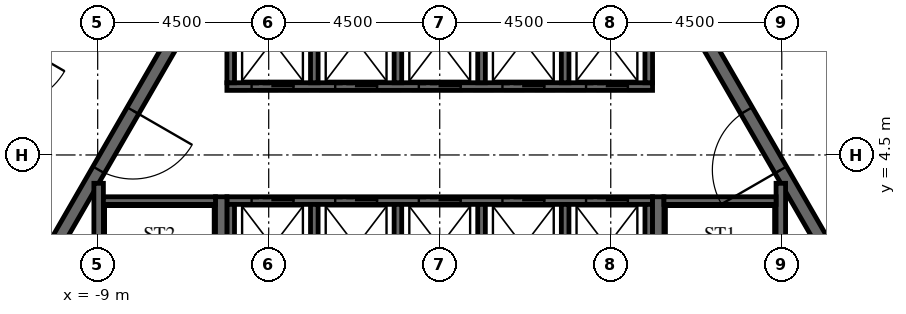
"""IFC4 building model, lengths in metres.
Left out: names, types, materials, properties, quantities, classifications, styles, units other than length and angle.
Written with IfcOpenShell. Run it as: python <this file> out.ifc"""

import sys

from ifc_helpers import new_model, si_unit, direction, frame, frame_2d, origin, place, context, subcontext, project, spatial, polyline, rectangle, outline, extrude, element, fill, save


model = new_model("IFC4")
c1 = context("Model", 3, precision=1e-05, world=origin(), true_north=direction((0.0, 1.0)))
c2 = subcontext(c1, "Body", "Model", "MODEL_VIEW")
j1 = project(units=[si_unit("LENGTHUNIT", "METRE"), si_unit("PLANEANGLEUNIT", "RADIAN")], contexts=[c1])
p1 = place(None, origin())
s1 = spatial("IfcSite", under=j1, at=p1, CompositionType="ELEMENT")
p2 = place(p1, origin())
s2 = spatial("IfcBuilding", under=s1, at=p2, CompositionType="ELEMENT")
p3 = place(p2, origin())
s3 = spatial("IfcBuildingStorey", under=s2, at=p3, CompositionType="ELEMENT", Elevation=0.0)
p4 = place(p3, frame((-7.91, 13.7, -2.1), z_axis=(0.0, 0.0, 1.0), x_axis=(-0.499999880136, -0.866025472988, 0.0)))
e1 = element("IfcWall", 1, at=p4, inside=s3, PredefinedType="SHEAR", context=c2, shape_type="SweptSolid", body=[
    extrude(outline(polyline([(-0.173, -0.3), (15.993, -0.3), (15.646, 0.3), (0.173, 0.3), (-0.173, -0.3)])), origin(), (0.0, 0.0, 1.0), 10.85),
])
p5 = place(p4, frame((7.039, 0.0, 2.1)))
e2 = element("IfcOpeningElement", 2, at=p5, cuts=e1, PredefinedType="OPENING", context=c2, shape_type="SweptSolid", body=[
    extrude(rectangle(XDim=1.8, YDim=2.4, at=frame_2d((0.9, 1.2))), frame((0.0, 0.31, 0.0), z_axis=(0.0, -1.0, 0.0), x_axis=(1.0, 0.0, 0.0)), (0.0, 0.0, 1.0), 0.62),
])
p6 = place(p3, frame((15.819, 0.0, -2.1), z_axis=(0.0, 0.0, 1.0), x_axis=(-0.499999880136, 0.866025472988, 0.0)))
e3 = element("IfcWall", 3, at=p6, inside=s3, PredefinedType="SHEAR", context=c2, shape_type="SweptSolid", body=[
    extrude(outline(polyline([(-0.173, -0.3), (15.993, -0.3), (15.646, 0.3), (0.173, 0.3), (-0.173, -0.3)])), origin(), (0.0, 0.0, 1.0), 10.85),
])
p7 = place(p6, frame((6.981, 0.0, 2.1)))
e4 = element("IfcOpeningElement", 4, at=p7, cuts=e3, PredefinedType="OPENING", context=c2, shape_type="SweptSolid", body=[
    extrude(rectangle(XDim=1.8, YDim=2.4, at=frame_2d((0.9, 1.2))), frame((0.0, 0.31, 0.0), z_axis=(0.0, -1.0, 0.0), x_axis=(1.0, 0.0, 0.0)), (0.0, 0.0, 1.0), 0.62),
])
p8 = place(p3, frame((-5.673, 9.825, -2.1), z_axis=(0.0, 0.0, 1.0), x_axis=(-0.499995046907, -0.866028263435, 0.0)))
e5 = element("IfcWall", 5, at=p8, inside=s3, PredefinedType="SHEAR", context=c2, shape_type="SweptSolid", body=[
    extrude(outline(polyline([(-0.101, -0.175), (11.446, -0.175), (11.244, 0.175), (0.101, 0.175), (-0.101, -0.175)])), origin(), (0.0, 0.0, 1.0), 10.85),
])
p9 = place(p8, frame((4.801, 0.0, 2.1)))
e6 = element("IfcOpeningElement", 6, at=p9, cuts=e5, PredefinedType="OPENING", context=c2, shape_type="SweptSolid", body=[
    extrude(rectangle(XDim=1.8, YDim=2.4, at=frame_2d((0.9, 1.2))), frame((0.0, 0.185, 0.0), z_axis=(0.0, -1.0, 0.0), x_axis=(1.0, 0.0, 0.0)), (0.0, 0.0, 1.0), 0.37),
])
p10 = place(p3, frame((11.345, 0.0, -2.1), z_axis=(0.0, 0.0, 1.0), x_axis=(-0.499995046907, 0.866028263435, 0.0)))
e7 = element("IfcWall", 7, at=p10, inside=s3, PredefinedType="SHEAR", context=c2, shape_type="SweptSolid", body=[
    extrude(outline(polyline([(-0.101, -0.175), (11.446, -0.175), (11.244, 0.175), (0.101, 0.175), (-0.101, -0.175)])), origin(), (0.0, 0.0, 1.0), 10.85),
])
p11 = place(p10, frame((4.744, 0.0, 2.1)))
e8 = element("IfcOpeningElement", 8, at=p11, cuts=e7, PredefinedType="OPENING", context=c2, shape_type="SweptSolid", body=[
    extrude(rectangle(XDim=1.8, YDim=2.4, at=frame_2d((0.9, 1.2))), frame((0.0, 0.185, 0.0), z_axis=(0.0, -1.0, 0.0), x_axis=(1.0, 0.0, 0.0)), (0.0, 0.0, 1.0), 0.37),
])
p12 = place(p3, frame((-5.6, 6.3, -2.1), z_axis=(0.0, 0.0, 1.0), x_axis=(1.0, 0.0, 0.0)))
e9 = element("IfcWall", 9, at=p12, inside=s3, PredefinedType="SHEAR", context=c2, shape_type="SweptSolid", body=[
    extrude(rectangle(XDim=11.2, YDim=0.2, at=frame_2d((5.6, 0.0))), origin(), (0.0, 0.0, 1.0), 10.85),
])
p13 = place(p12, frame((0.65, 0.0, 2.1)))
e10 = element("IfcOpeningElement", 10, at=p13, cuts=e9, PredefinedType="OPENING", context=c2, shape_type="SweptSolid", body=[
    extrude(rectangle(XDim=1.1, YDim=2.1, at=frame_2d((0.55, 1.05))), frame((0.0, 0.11, 0.0), z_axis=(0.0, -1.0, 0.0), x_axis=(1.0, 0.0, 0.0)), (0.0, 0.0, 1.0), 0.22),
])
p14 = place(p12, frame((2.85, 0.0, 2.1)))
e11 = element("IfcOpeningElement", 11, at=p14, cuts=e9, PredefinedType="OPENING", context=c2, shape_type="SweptSolid", body=[
    extrude(rectangle(XDim=1.1, YDim=2.1, at=frame_2d((0.55, 1.05))), frame((0.0, 0.11, 0.0), z_axis=(0.0, -1.0, 0.0), x_axis=(1.0, 0.0, 0.0)), (0.0, 0.0, 1.0), 0.22),
])
p15 = place(p12, frame((5.05, 0.0, 2.1)))
e12 = element("IfcOpeningElement", 12, at=p15, cuts=e9, PredefinedType="OPENING", context=c2, shape_type="SweptSolid", body=[
    extrude(rectangle(XDim=1.1, YDim=2.1, at=frame_2d((0.55, 1.05))), frame((0.0, 0.11, 0.0), z_axis=(0.0, -1.0, 0.0), x_axis=(1.0, 0.0, 0.0)), (0.0, 0.0, 1.0), 0.22),
])
p16 = place(p12, frame((7.25, 0.0, 2.1)))
e13 = element("IfcOpeningElement", 13, at=p16, cuts=e9, PredefinedType="OPENING", context=c2, shape_type="SweptSolid", body=[
    extrude(rectangle(XDim=1.1, YDim=2.1, at=frame_2d((0.55, 1.05))), frame((0.0, 0.11, 0.0), z_axis=(0.0, -1.0, 0.0), x_axis=(1.0, 0.0, 0.0)), (0.0, 0.0, 1.0), 0.22),
])
p17 = place(p12, frame((9.45, 0.0, 2.1)))
e14 = element("IfcOpeningElement", 14, at=p17, cuts=e9, PredefinedType="OPENING", context=c2, shape_type="SweptSolid", body=[
    extrude(rectangle(XDim=1.1, YDim=2.1, at=frame_2d((0.55, 1.05))), frame((0.0, 0.11, 0.0), z_axis=(0.0, -1.0, 0.0), x_axis=(1.0, 0.0, 0.0)), (0.0, 0.0, 1.0), 0.22),
])
for number, where, z_axis, x_axis in (
    (15, (-5.5, 6.4, -2.1), (0.0, 0.0, 1.0), (0.0, 1.0, 0.0)),
    (16, (-3.3, 6.4, -2.1), (0.0, 0.0, 1.0), (0.0, 1.0, 0.0)),
    (17, (-1.1, 6.4, -2.1), (0.0, 0.0, 1.0), (0.0, 1.0, 0.0)),
    (18, (1.1, 6.4, -2.1), (0.0, 0.0, 1.0), (0.0, 1.0, 0.0)),
    (19, (3.3, 6.4, -2.1), (0.0, 0.0, 1.0), (0.0, 1.0, 0.0)),
    (20, (5.5, 6.4, -2.1), (0.0, 0.0, 1.0), (0.0, 1.0, 0.0)),
):
    element("IfcWall", number, at=place(p3, frame(where, z_axis=z_axis, x_axis=x_axis)), inside=s3, PredefinedType="SHEAR", context=c2, shape_type="SweptSolid", body=[
        extrude(rectangle(XDim=2.9, YDim=0.2, at=frame_2d((1.45, 0.0))), origin(), (0.0, 0.0, 1.0), 10.85),
    ])
p18 = place(p3, frame((-5.6, 3.3, -2.1), z_axis=(0.0, 0.0, 1.0), x_axis=(1.0, 0.0, 0.0)))
e21 = element("IfcWall", 21, at=p18, inside=s3, PredefinedType="SHEAR", context=c2, shape_type="SweptSolid", body=[
    extrude(rectangle(XDim=11.2, YDim=0.2, at=frame_2d((5.6, 0.0))), origin(), (0.0, 0.0, 1.0), 10.85),
])
p19 = place(p18, frame((0.65, 0.0, 2.1)))
e22 = element("IfcOpeningElement", 22, at=p19, cuts=e21, PredefinedType="OPENING", context=c2, shape_type="SweptSolid", body=[
    extrude(rectangle(XDim=1.1, YDim=2.1, at=frame_2d((0.55, 1.05))), frame((0.0, 0.11, 0.0), z_axis=(0.0, -1.0, 0.0), x_axis=(1.0, 0.0, 0.0)), (0.0, 0.0, 1.0), 0.22),
])
p20 = place(p18, frame((2.85, 0.0, 2.1)))
e23 = element("IfcOpeningElement", 23, at=p20, cuts=e21, PredefinedType="OPENING", context=c2, shape_type="SweptSolid", body=[
    extrude(rectangle(XDim=1.1, YDim=2.1, at=frame_2d((0.55, 1.05))), frame((0.0, 0.11, 0.0), z_axis=(0.0, -1.0, 0.0), x_axis=(1.0, 0.0, 0.0)), (0.0, 0.0, 1.0), 0.22),
])
p21 = place(p18, frame((5.05, 0.0, 2.1)))
e24 = element("IfcOpeningElement", 24, at=p21, cuts=e21, PredefinedType="OPENING", context=c2, shape_type="SweptSolid", body=[
    extrude(rectangle(XDim=1.1, YDim=2.1, at=frame_2d((0.55, 1.05))), frame((0.0, 0.11, 0.0), z_axis=(0.0, -1.0, 0.0), x_axis=(1.0, 0.0, 0.0)), (0.0, 0.0, 1.0), 0.22),
])
p22 = place(p18, frame((7.25, 0.0, 2.1)))
e25 = element("IfcOpeningElement", 25, at=p22, cuts=e21, PredefinedType="OPENING", context=c2, shape_type="SweptSolid", body=[
    extrude(rectangle(XDim=1.1, YDim=2.1, at=frame_2d((0.55, 1.05))), frame((0.0, 0.11, 0.0), z_axis=(0.0, -1.0, 0.0), x_axis=(1.0, 0.0, 0.0)), (0.0, 0.0, 1.0), 0.22),
])
p23 = place(p18, frame((9.45, 0.0, 2.1)))
e26 = element("IfcOpeningElement", 26, at=p23, cuts=e21, PredefinedType="OPENING", context=c2, shape_type="SweptSolid", body=[
    extrude(rectangle(XDim=1.1, YDim=2.1, at=frame_2d((0.55, 1.05))), frame((0.0, 0.11, 0.0), z_axis=(0.0, -1.0, 0.0), x_axis=(1.0, 0.0, 0.0)), (0.0, 0.0, 1.0), 0.22),
])
for number, where, z_axis, x_axis in (
    (27, (-5.5, 0.1, -2.1), (0.0, 0.0, 1.0), (0.0, 1.0, 0.0)),
    (28, (-3.3, 0.1, -2.1), (0.0, 0.0, 1.0), (0.0, 1.0, 0.0)),
    (29, (-1.1, 0.1, -2.1), (0.0, 0.0, 1.0), (0.0, 1.0, 0.0)),
    (30, (1.1, 0.1, -2.1), (0.0, 0.0, 1.0), (0.0, 1.0, 0.0)),
    (31, (3.3, 0.1, -2.1), (0.0, 0.0, 1.0), (0.0, 1.0, 0.0)),
    (32, (5.5, 0.1, -2.1), (0.0, 0.0, 1.0), (0.0, 1.0, 0.0)),
):
    element("IfcWall", number, at=place(p3, frame(where, z_axis=z_axis, x_axis=x_axis)), inside=s3, PredefinedType="SHEAR", context=c2, shape_type="SweptSolid", body=[
        extrude(rectangle(XDim=3.1, YDim=0.2, at=frame_2d((1.55, 0.0))), origin(), (0.0, 0.0, 1.0), 10.85),
    ])
p24 = place(p3, frame((5.75, -3.4, -2.1), z_axis=(0.0, 0.0, 1.0), x_axis=(0.0, 1.0, 0.0)))
e33 = element("IfcWall", 33, at=p24, inside=s3, PredefinedType="SHEAR", context=c2, shape_type="SweptSolid", body=[
    extrude(rectangle(XDim=6.8, YDim=0.3, at=frame_2d((3.4, 0.0))), origin(), (0.0, 0.0, 1.0), 10.85),
])
p25 = place(p3, frame((8.975, -3.755, -2.1), z_axis=(0.0, 0.0, 1.0), x_axis=(0.0, 1.0, 0.0)))
e34 = element("IfcWall", 34, at=p25, inside=s3, PredefinedType="SHEAR", context=c2, shape_type="SweptSolid", body=[
    extrude(rectangle(XDim=7.51, YDim=0.25, at=frame_2d((3.755, 0.0))), origin(), (0.0, 0.0, 1.0), 10.85),
])
p26 = place(p3, frame((5.9, 3.3, -2.1), z_axis=(0.0, 0.0, 1.0), x_axis=(1.0, 0.0, 0.0)))
e35 = element("IfcWall", 35, at=p26, inside=s3, PredefinedType="SHEAR", context=c2, shape_type="SweptSolid", body=[
    extrude(rectangle(XDim=2.95, YDim=0.2, at=frame_2d((1.475, 0.0))), origin(), (0.0, 0.0, 1.0), 10.85),
])
p27 = place(p3, frame((-5.75, -3.4, -2.1), z_axis=(0.0, 0.0, 1.0), x_axis=(0.0, 1.0, 0.0)))
e36 = element("IfcWall", 36, at=p27, inside=s3, PredefinedType="SHEAR", context=c2, shape_type="SweptSolid", body=[
    extrude(rectangle(XDim=6.8, YDim=0.3, at=frame_2d((3.4, 0.0))), origin(), (0.0, 0.0, 1.0), 10.85),
])
p28 = place(p3, frame((-8.975, -3.755, -2.1), z_axis=(0.0, 0.0, 1.0), x_axis=(0.0, 1.0, 0.0)))
e37 = element("IfcWall", 37, at=p28, inside=s3, PredefinedType="SHEAR", context=c2, shape_type="SweptSolid", body=[
    extrude(rectangle(XDim=7.51, YDim=0.25, at=frame_2d((3.755, 0.0))), origin(), (0.0, 0.0, 1.0), 10.85),
])
p29 = place(p3, frame((-8.85, 3.3, -2.1), z_axis=(0.0, 0.0, 1.0), x_axis=(1.0, 0.0, 0.0)))
e38 = element("IfcWall", 38, at=p29, inside=s3, PredefinedType="SHEAR", context=c2, shape_type="SweptSolid", body=[
    extrude(rectangle(XDim=2.95, YDim=0.2, at=frame_2d((1.475, 0.0))), origin(), (0.0, 0.0, 1.0), 10.85),
])
p30 = place(p9, origin())
e39 = element("IfcDoor", 39, at=p30, inside=s3, OperationType="DOUBLE_DOOR_SINGLE_SWING", PredefinedType="DOOR", context=c2, shape_type="SweptSolid", body=[
    extrude(rectangle(XDim=1.8, YDim=2.4, at=frame_2d((0.9, 1.2))), frame((0.0, 0.025, 0.0), z_axis=(0.0, -1.0, 0.0), x_axis=(1.0, 0.0, 0.0)), (0.0, 0.0, 1.0), 0.05),
])
fill(e6, e39)
p31 = place(p11, origin())
e40 = element("IfcDoor", 40, at=p31, inside=s3, OperationType="DOUBLE_DOOR_SINGLE_SWING", PredefinedType="DOOR", context=c2, shape_type="SweptSolid", body=[
    extrude(rectangle(XDim=1.8, YDim=2.4, at=frame_2d((0.9, 1.2))), frame((0.0, 0.025, 0.0), z_axis=(0.0, -1.0, 0.0), x_axis=(1.0, 0.0, 0.0)), (0.0, 0.0, 1.0), 0.05),
])
fill(e8, e40)
p32 = place(p13, origin())
e41 = element("IfcDoor", 41, at=p32, inside=s3, OperationType="SLIDING_TO_LEFT", PredefinedType="DOOR", context=c2, shape_type="SweptSolid", body=[
    extrude(rectangle(XDim=1.1, YDim=2.1, at=frame_2d((0.55, 1.05))), frame((0.0, 0.025, 0.0), z_axis=(0.0, -1.0, 0.0), x_axis=(1.0, 0.0, 0.0)), (0.0, 0.0, 1.0), 0.05),
])
fill(e10, e41)
p33 = place(p14, origin())
e42 = element("IfcDoor", 42, at=p33, inside=s3, OperationType="SLIDING_TO_LEFT", PredefinedType="DOOR", context=c2, shape_type="SweptSolid", body=[
    extrude(rectangle(XDim=1.1, YDim=2.1, at=frame_2d((0.55, 1.05))), frame((0.0, 0.025, 0.0), z_axis=(0.0, -1.0, 0.0), x_axis=(1.0, 0.0, 0.0)), (0.0, 0.0, 1.0), 0.05),
])
fill(e11, e42)
p34 = place(p15, origin())
e43 = element("IfcDoor", 43, at=p34, inside=s3, OperationType="SLIDING_TO_LEFT", PredefinedType="DOOR", context=c2, shape_type="SweptSolid", body=[
    extrude(rectangle(XDim=1.1, YDim=2.1, at=frame_2d((0.55, 1.05))), frame((0.0, 0.025, 0.0), z_axis=(0.0, -1.0, 0.0), x_axis=(1.0, 0.0, 0.0)), (0.0, 0.0, 1.0), 0.05),
])
fill(e12, e43)
p35 = place(p16, origin())
e44 = element("IfcDoor", 44, at=p35, inside=s3, OperationType="SLIDING_TO_LEFT", PredefinedType="DOOR", context=c2, shape_type="SweptSolid", body=[
    extrude(rectangle(XDim=1.1, YDim=2.1, at=frame_2d((0.55, 1.05))), frame((0.0, 0.025, 0.0), z_axis=(0.0, -1.0, 0.0), x_axis=(1.0, 0.0, 0.0)), (0.0, 0.0, 1.0), 0.05),
])
fill(e13, e44)
p36 = place(p17, origin())
e45 = element("IfcDoor", 45, at=p36, inside=s3, OperationType="SLIDING_TO_LEFT", PredefinedType="DOOR", context=c2, shape_type="SweptSolid", body=[
    extrude(rectangle(XDim=1.1, YDim=2.1, at=frame_2d((0.55, 1.05))), frame((0.0, 0.025, 0.0), z_axis=(0.0, -1.0, 0.0), x_axis=(1.0, 0.0, 0.0)), (0.0, 0.0, 1.0), 0.05),
])
fill(e14, e45)
p37 = place(p19, origin())
e46 = element("IfcDoor", 46, at=p37, inside=s3, OperationType="SLIDING_TO_LEFT", PredefinedType="DOOR", context=c2, shape_type="SweptSolid", body=[
    extrude(rectangle(XDim=1.1, YDim=2.1, at=frame_2d((0.55, 1.05))), frame((0.0, 0.025, 0.0), z_axis=(0.0, -1.0, 0.0), x_axis=(1.0, 0.0, 0.0)), (0.0, 0.0, 1.0), 0.05),
])
fill(e22, e46)
p38 = place(p20, origin())
e47 = element("IfcDoor", 47, at=p38, inside=s3, OperationType="SLIDING_TO_LEFT", PredefinedType="DOOR", context=c2, shape_type="SweptSolid", body=[
    extrude(rectangle(XDim=1.1, YDim=2.1, at=frame_2d((0.55, 1.05))), frame((0.0, 0.025, 0.0), z_axis=(0.0, -1.0, 0.0), x_axis=(1.0, 0.0, 0.0)), (0.0, 0.0, 1.0), 0.05),
])
fill(e23, e47)
p39 = place(p21, origin())
e48 = element("IfcDoor", 48, at=p39, inside=s3, OperationType="SLIDING_TO_LEFT", PredefinedType="DOOR", context=c2, shape_type="SweptSolid", body=[
    extrude(rectangle(XDim=1.1, YDim=2.1, at=frame_2d((0.55, 1.05))), frame((0.0, 0.025, 0.0), z_axis=(0.0, -1.0, 0.0), x_axis=(1.0, 0.0, 0.0)), (0.0, 0.0, 1.0), 0.05),
])
fill(e24, e48)
p40 = place(p22, origin())
e49 = element("IfcDoor", 49, at=p40, inside=s3, OperationType="SLIDING_TO_LEFT", PredefinedType="DOOR", context=c2, shape_type="SweptSolid", body=[
    extrude(rectangle(XDim=1.1, YDim=2.1, at=frame_2d((0.55, 1.05))), frame((0.0, 0.025, 0.0), z_axis=(0.0, -1.0, 0.0), x_axis=(1.0, 0.0, 0.0)), (0.0, 0.0, 1.0), 0.05),
])
fill(e25, e49)
p41 = place(p23, origin())
e50 = element("IfcDoor", 50, at=p41, inside=s3, OperationType="SLIDING_TO_LEFT", PredefinedType="DOOR", context=c2, shape_type="SweptSolid", body=[
    extrude(rectangle(XDim=1.1, YDim=2.1, at=frame_2d((0.55, 1.05))), frame((0.0, 0.025, 0.0), z_axis=(0.0, -1.0, 0.0), x_axis=(1.0, 0.0, 0.0)), (0.0, 0.0, 1.0), 0.05),
])
fill(e26, e50)
save(model, sys.argv[1])
